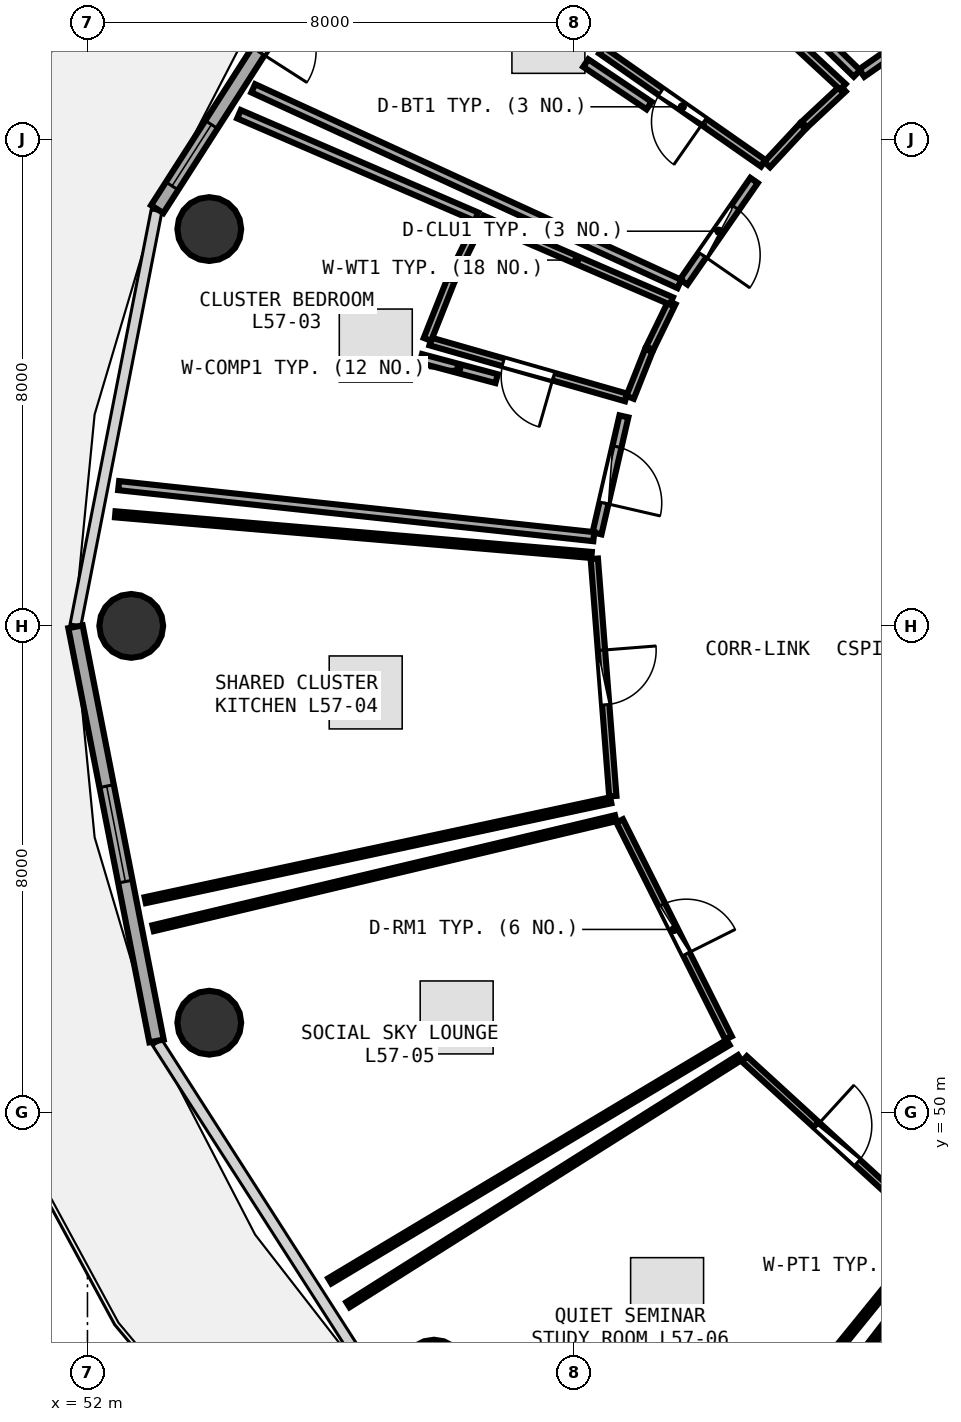
"""IFC4 building model, lengths in metres.
Left out: names, types, materials, properties, quantities, classifications, styles, units other than length and angle.
Written with IfcOpenShell. Run it as: python <this file> out.ifc"""

import sys

from ifc_helpers import new_model, si_unit, direction, frame, frame_2d, origin, origin_2d, place, context, subcontext, project, spatial, rectangle, circle, extrude, element, fill, save


model = new_model("IFC4")
c1 = context("Model", 3, precision=1e-05, world=origin(), true_north=direction((0.0, 1.0)))
c2 = subcontext(c1, "Body", "Model", "MODEL_VIEW")
j1 = project(units=[si_unit("LENGTHUNIT", "METRE"), si_unit("PLANEANGLEUNIT", "RADIAN")], contexts=[c1])
p1 = place(None, origin())
s1 = spatial("IfcSite", under=j1, at=p1, CompositionType="ELEMENT")
p2 = place(p1, origin())
s2 = spatial("IfcBuilding", under=s1, at=p2, CompositionType="ELEMENT")
p3 = place(p2, frame((0.0, 0.0, 223.2)))
s3 = spatial("IfcBuildingStorey", under=s2, at=p3, CompositionType="ELEMENT", Elevation=223.2)
for number, where, z_axis, x_axis in (
    (1, (54.003, 64.526, 0.0), (0.0, 0.0, 1.0), (1.0, 0.0, 0.0)),
    (2, (52.72, 58.0, 0.0), (0.0, 0.0, 1.0), (1.0, 0.0, 0.0)),
    (3, (54.003, 51.474, 0.0), (0.0, 0.0, 1.0), (1.0, 0.0, 0.0)),
    (4, (57.698, 45.736, 0.0), (0.0, 0.0, 1.0), (1.0, 0.0, 0.0)),
):
    element("IfcColumn", number, at=place(p3, frame(where, z_axis=z_axis, x_axis=x_axis)), inside=s3, PredefinedType="COLUMN", context=c2, shape_type="SweptSolid", body=[
        extrude(circle(Radius=0.525, at=origin_2d()), origin(), (0.0, 0.0, 1.0), 3.75),
    ])
p4 = place(p3, frame((56.986, 70.843, 0.0), z_axis=(0.0, 0.0, 1.0), x_axis=(-0.539539512973, -0.841960280501, 0.0)))
e5 = element("IfcWall", 5, at=p4, inside=s3, PredefinedType="SOLIDWALL", context=c2, shape_type="SweptSolid", body=[
    extrude(rectangle(XDim=7.115, YDim=0.24, at=frame_2d((3.557, 0.0))), origin(), (0.0, 0.0, 1.0), 3.475),
])
p5 = place(p4, frame((3.082, 0.0, 0.0)))
e6 = element("IfcOpeningElement", 6, at=p5, cuts=e5, PredefinedType="OPENING", context=c2, shape_type="SweptSolid", body=[
    extrude(rectangle(XDim=0.95, YDim=2.1, at=frame_2d((0.475, 1.05))), frame((0.0, 0.13, 0.0), z_axis=(0.0, -1.0, 0.0), x_axis=(1.0, 0.0, 0.0)), (0.0, 0.0, 1.0), 0.26),
])
p6 = place(p4, frame((5.462, 0.0, 0.85)))
e7 = element("IfcOpeningElement", 7, at=p6, cuts=e5, PredefinedType="OPENING", context=c2, shape_type="SweptSolid", body=[
    extrude(rectangle(XDim=1.2, YDim=1.45, at=frame_2d((0.6, 0.725))), frame((0.0, 0.13, 0.0), z_axis=(0.0, -1.0, 0.0), x_axis=(1.0, 0.0, 0.0)), (0.0, 0.0, 1.0), 0.26),
])
p7 = place(p3, frame((51.803, 57.985, 0.0), z_axis=(0.0, 0.0, 1.0), x_axis=(0.192069055673, -0.981381413036, 0.0)))
e8 = element("IfcWall", 8, at=p7, inside=s3, PredefinedType="SOLIDWALL", context=c2, shape_type="SweptSolid", body=[
    extrude(rectangle(XDim=6.94, YDim=0.24, at=frame_2d((3.47, 0.0))), origin(), (0.0, 0.0, 1.0), 3.475),
])
p8 = place(p7, frame((2.67, 0.0, 0.85)))
e9 = element("IfcOpeningElement", 9, at=p8, cuts=e8, PredefinedType="OPENING", context=c2, shape_type="SweptSolid", body=[
    extrude(rectangle(XDim=1.6, YDim=1.45, at=frame_2d((0.8, 0.725))), frame((0.0, 0.13, 0.0), z_axis=(0.0, -1.0, 0.0), x_axis=(1.0, 0.0, 0.0)), (0.0, 0.0, 1.0), 0.26),
])
p9 = place(p3, frame((66.466, 68.302, 0.0), z_axis=(0.0, 0.0, 1.0), x_axis=(-0.819606107513, -0.572927419948, 0.0)))
e10 = element("IfcWall", 10, at=p9, inside=s3, PredefinedType="PARTITIONING", context=c2, shape_type="SweptSolid", body=[
    extrude(rectangle(XDim=2.114, YDim=0.15, at=frame_2d((1.057, 0.0))), origin(), (0.0, 0.0, 1.0), 3.025),
])
p10 = place(p9, frame((0.582, 0.0, 0.0)))
e11 = element("IfcOpeningElement", 11, at=p10, cuts=e10, PredefinedType="OPENING", context=c2, shape_type="SweptSolid", body=[
    extrude(rectangle(XDim=0.95, YDim=2.08, at=frame_2d((0.475, 1.04))), frame((0.0, 0.085, 0.0), z_axis=(0.0, -1.0, 0.0), x_axis=(1.0, 0.0, 0.0)), (0.0, 0.0, 1.0), 0.17),
])
p11 = place(p3, frame((63.115, 65.606, 0.0), z_axis=(0.0, 0.0, 1.0), x_axis=(-0.819768322712, 0.57269529165, 0.0)))
e12 = element("IfcWall", 12, at=p11, inside=s3, PredefinedType="PLUMBINGWALL", context=c2, shape_type="SweptSolid", body=[
    extrude(rectangle(XDim=3.248, YDim=0.13, at=frame_2d((1.624, 0.0))), origin(), (0.0, 0.0, 1.0), 3.175),
])
p12 = place(p11, frame((1.194, 0.0, 0.0)))
e13 = element("IfcOpeningElement", 13, at=p12, cuts=e12, PredefinedType="OPENING", context=c2, shape_type="SweptSolid", body=[
    extrude(rectangle(XDim=0.86, YDim=2.05, at=frame_2d((0.43, 1.025))), frame((0.0, 0.075, 0.0), z_axis=(0.0, -1.0, 0.0), x_axis=(1.0, 0.0, 0.0)), (0.0, 0.0, 1.0), 0.15),
])
p13 = place(p3, frame((62.963, 65.326, 0.0), z_axis=(0.0, 0.0, 1.0), x_axis=(-0.569634666298, -0.821898014933, 0.0)))
e14 = element("IfcWall", 14, at=p13, inside=s3, PredefinedType="PARTITIONING", context=c2, shape_type="SweptSolid", body=[
    extrude(rectangle(XDim=2.032, YDim=0.15, at=frame_2d((1.016, 0.0))), origin(), (0.0, 0.0, 1.0), 3.025),
])
p14 = place(p13, frame((0.541, 0.0, 0.0)))
e15 = element("IfcOpeningElement", 15, at=p14, cuts=e14, PredefinedType="OPENING", context=c2, shape_type="SweptSolid", body=[
    extrude(rectangle(XDim=0.95, YDim=2.08, at=frame_2d((0.475, 1.04))), frame((0.0, 0.085, 0.0), z_axis=(0.0, -1.0, 0.0), x_axis=(1.0, 0.0, 0.0)), (0.0, 0.0, 1.0), 0.17),
])
p15 = place(p3, frame((60.859, 61.757, 0.0), z_axis=(0.0, 0.0, 1.0), x_axis=(-0.961479890051, 0.274875282679, 0.0)))
e16 = element("IfcWall", 16, at=p15, inside=s3, PredefinedType="PLUMBINGWALL", context=c2, shape_type="SweptSolid", body=[
    extrude(rectangle(XDim=3.347, YDim=0.13, at=frame_2d((1.673, 0.0))), origin(), (0.0, 0.0, 1.0), 3.175),
])
p16 = place(p15, frame((1.243, 0.0, 0.0)))
e17 = element("IfcOpeningElement", 17, at=p16, cuts=e16, PredefinedType="OPENING", context=c2, shape_type="SweptSolid", body=[
    extrude(rectangle(XDim=0.86, YDim=2.05, at=frame_2d((0.43, 1.025))), frame((0.0, 0.075, 0.0), z_axis=(0.0, -1.0, 0.0), x_axis=(1.0, 0.0, 0.0)), (0.0, 0.0, 1.0), 0.15),
])
p17 = place(p3, frame((60.823, 61.446, 0.0), z_axis=(0.0, 0.0, 1.0), x_axis=(-0.223956243079, -0.97459920028, 0.0)))
e18 = element("IfcWall", 18, at=p17, inside=s3, PredefinedType="PARTITIONING", context=c2, shape_type="SweptSolid", body=[
    extrude(rectangle(XDim=1.974, YDim=0.15, at=frame_2d((0.987, 0.0))), origin(), (0.0, 0.0, 1.0), 3.48),
])
p18 = place(p17, frame((0.512, 0.0, 0.0)))
e19 = element("IfcOpeningElement", 19, at=p18, cuts=e18, PredefinedType="OPENING", context=c2, shape_type="SweptSolid", body=[
    extrude(rectangle(XDim=0.95, YDim=2.08, at=frame_2d((0.475, 1.04))), frame((0.0, 0.085, 0.0), z_axis=(0.0, -1.0, 0.0), x_axis=(1.0, 0.0, 0.0)), (0.0, 0.0, 1.0), 0.17),
])
p19 = place(p3, frame((60.336, 59.103, 0.0), z_axis=(0.0, 0.0, 1.0), x_axis=(0.07781697677, -0.996967661525, 0.0)))
e20 = element("IfcWall", 20, at=p19, inside=s3, PredefinedType="PARTITIONING", context=c2, shape_type="SweptSolid", body=[
    extrude(rectangle(XDim=3.916, YDim=0.12, at=frame_2d((1.958, 0.0))), origin(), (0.0, 0.0, 1.0), 3.025),
])
p20 = place(p19, frame((1.508, 0.0, 0.0)))
e21 = element("IfcOpeningElement", 21, at=p20, cuts=e20, PredefinedType="OPENING", context=c2, shape_type="SweptSolid", body=[
    extrude(rectangle(XDim=0.9, YDim=2.08, at=frame_2d((0.45, 1.04))), frame((0.0, 0.07, 0.0), z_axis=(0.0, -1.0, 0.0), x_axis=(1.0, 0.0, 0.0)), (0.0, 0.0, 1.0), 0.14),
])
p21 = place(p3, frame((60.753, 54.793, 0.0), z_axis=(0.0, 0.0, 1.0), x_axis=(0.448191244457, -0.893937698272, 0.0)))
e22 = element("IfcWall", 22, at=p21, inside=s3, PredefinedType="PARTITIONING", context=c2, shape_type="SweptSolid", body=[
    extrude(rectangle(XDim=3.994, YDim=0.12, at=frame_2d((1.997, 0.0))), origin(), (0.0, 0.0, 1.0), 3.025),
])
p22 = place(p21, frame((1.547, 0.0, 0.0)))
e23 = element("IfcOpeningElement", 23, at=p22, cuts=e22, PredefinedType="OPENING", context=c2, shape_type="SweptSolid", body=[
    extrude(rectangle(XDim=0.9, YDim=2.08, at=frame_2d((0.45, 1.04))), frame((0.0, 0.07, 0.0), z_axis=(0.0, -1.0, 0.0), x_axis=(1.0, 0.0, 0.0)), (0.0, 0.0, 1.0), 0.14),
])
p23 = place(p3, frame((62.803, 50.879, 0.0), z_axis=(0.0, 0.0, 1.0), x_axis=(0.737723633035, -0.675102837545, 0.0)))
e24 = element("IfcWall", 24, at=p23, inside=s3, PredefinedType="PARTITIONING", context=c2, shape_type="SweptSolid", body=[
    extrude(rectangle(XDim=4.144, YDim=0.12, at=frame_2d((2.072, 0.0))), origin(), (0.0, 0.0, 1.0), 3.025),
])
p24 = place(p23, frame((1.622, 0.0, 0.0)))
e25 = element("IfcOpeningElement", 25, at=p24, cuts=e24, PredefinedType="OPENING", context=c2, shape_type="SweptSolid", body=[
    extrude(rectangle(XDim=0.9, YDim=2.08, at=frame_2d((0.45, 1.04))), frame((0.0, 0.07, 0.0), z_axis=(0.0, -1.0, 0.0), x_axis=(1.0, 0.0, 0.0)), (0.0, 0.0, 1.0), 0.14),
])
p25 = place(p3, frame((64.655, 67.085, 0.0), z_axis=(0.0, 0.0, 1.0), x_axis=(-0.716418161924, 0.697671138335, 0.0)))
e26 = element("IfcWall", 26, at=p25, inside=s3, PredefinedType="PARTITIONING", context=c2, shape_type="SweptSolid", body=[
    extrude(rectangle(XDim=7.449, YDim=0.15, at=frame_2d((3.725, 0.0))), origin(), (0.0, 0.0, 1.0), 3.075),
])
p26 = place(p3, frame((64.425, 66.836, 0.0), z_axis=(0.0, 0.0, 1.0), x_axis=(-0.73090544696, -0.68247873784, 0.0)))
e27 = element("IfcWall", 27, at=p26, inside=s3, PredefinedType="PLUMBINGWALL", context=c2, shape_type="SweptSolid", body=[
    extrude(rectangle(XDim=0.867, YDim=0.13, at=frame_2d((0.434, 0.0))), origin(), (0.0, 0.0, 1.0), 3.025),
])
p27 = place(p3, frame((63.763, 66.216, 0.0), z_axis=(0.0, 0.0, 1.0), x_axis=(-0.681245485542, -0.732055044672, 0.0)))
e28 = element("IfcWall", 28, at=p27, inside=s3, PredefinedType="PLUMBINGWALL", context=c2, shape_type="SweptSolid", body=[
    extrude(rectangle(XDim=0.86, YDim=0.13, at=frame_2d((0.43, 0.0))), origin(), (0.0, 0.0, 1.0), 3.025),
])
p28 = place(p3, frame((62.02, 69.091, 0.0), z_axis=(0.0, 0.0, 1.0), x_axis=(0.733691925976, -0.679482271849, 0.0)))
e29 = element("IfcWall", 29, at=p28, inside=s3, PredefinedType="PLUMBINGWALL", context=c2, shape_type="SweptSolid", body=[
    extrude(rectangle(XDim=3.279, YDim=0.13, at=frame_2d((1.639, 0.0))), origin(), (0.0, 0.0, 1.0), 3.175),
])
p29 = place(p3, frame((61.735, 63.623, 0.0), z_axis=(0.0, 0.0, 1.0), x_axis=(-0.908799831152, 0.417232389561, 0.0)))
e30 = element("IfcWall", 30, at=p29, inside=s3, PredefinedType="PARTITIONING", context=c2, shape_type="SweptSolid", body=[
    extrude(rectangle(XDim=7.712, YDim=0.15, at=frame_2d((3.856, 0.0))), origin(), (0.0, 0.0, 1.0), 3.025),
])
p30 = place(p3, frame((60.195, 67.256, 0.0), z_axis=(0.0, 0.0, 1.0), x_axis=(0.830279043522, -0.557347925347, 0.0)))
e31 = element("IfcWall", 31, at=p30, inside=s3, PredefinedType="PARTITIONING", context=c2, shape_type="SweptSolid", body=[
    extrude(rectangle(XDim=1.254, YDim=0.15, at=frame_2d((0.627, 0.0))), origin(), (0.0, 0.0, 1.0), 3.175),
])
p31 = place(p3, frame((61.613, 63.318, 0.0), z_axis=(0.0, 0.0, 1.0), x_axis=(-0.437484879269, -0.899225767208, 0.0)))
e32 = element("IfcWall", 32, at=p31, inside=s3, PredefinedType="PLUMBINGWALL", context=c2, shape_type="SweptSolid", body=[
    extrude(rectangle(XDim=0.835, YDim=0.13, at=frame_2d((0.418, 0.0))), origin(), (0.0, 0.0, 1.0), 3.235),
])
p32 = place(p3, frame((61.232, 62.531, 0.0), z_axis=(0.0, 0.0, 1.0), x_axis=(-0.369921104598, -0.929063171358, 0.0)))
e33 = element("IfcWall", 33, at=p32, inside=s3, PredefinedType="PLUMBINGWALL", context=c2, shape_type="SweptSolid", body=[
    extrude(rectangle(XDim=0.831, YDim=0.13, at=frame_2d((0.416, 0.0))), origin(), (0.0, 0.0, 1.0), 3.235),
])
p33 = place(p3, frame((57.591, 62.712, 0.0), z_axis=(0.0, 0.0, 1.0), x_axis=(0.368988727478, 0.929433870157, 0.0)))
e34 = element("IfcWall", 34, at=p33, inside=s3, PredefinedType="PLUMBINGWALL", context=c2, shape_type="SweptSolid", body=[
    extrude(rectangle(XDim=1.052, YDim=0.13, at=frame_2d((0.526, 0.0))), origin(), (0.0, 0.0, 1.0), 3.48),
])
p34 = place(p3, frame((57.996, 63.726, 0.0), z_axis=(0.0, 0.0, 1.0), x_axis=(0.438432715101, 0.898764014816, 0.0)))
e35 = element("IfcWall", 35, at=p34, inside=s3, PredefinedType="PLUMBINGWALL", context=c2, shape_type="SweptSolid", body=[
    extrude(rectangle(XDim=1.059, YDim=0.13, at=frame_2d((0.53, 0.0))), origin(), (0.0, 0.0, 1.0), 3.025),
])
p35 = place(p3, frame((58.487, 64.688, 0.0), z_axis=(0.0, 0.0, 1.0), x_axis=(0.918238400885, -0.396028078727, 0.0)))
e36 = element("IfcWall", 36, at=p35, inside=s3, PredefinedType="PLUMBINGWALL", context=c2, shape_type="SweptSolid", body=[
    extrude(rectangle(XDim=3.394, YDim=0.13, at=frame_2d((1.697, 0.0))), origin(), (0.0, 0.0, 1.0), 3.025),
])
p36 = place(p3, frame((60.327, 59.467, 0.0), z_axis=(0.0, 0.0, 1.0), x_axis=(-0.994280915129, 0.10679635673, 0.0)))
e37 = element("IfcWall", 37, at=p36, inside=s3, PredefinedType="PARTITIONING", context=c2, shape_type="SweptSolid", body=[
    extrude(rectangle(XDim=7.859, YDim=0.15, at=frame_2d((3.93, 0.0))), origin(), (0.0, 0.0, 1.0), 3.075),
])
p37 = place(p3, frame((54.492, 66.414, 0.0), z_axis=(0.0, 0.0, 1.0), x_axis=(0.918147334224, -0.396239160934, 0.0)))
e38 = element("IfcWall", 38, at=p37, inside=s3, PredefinedType="PARTITIONING", context=c2, shape_type="SweptSolid", body=[
    extrude(rectangle(XDim=4.253, YDim=0.15, at=frame_2d((2.126, 0.0))), origin(), (0.0, 0.0, 1.0), 3.025),
])
p38 = place(p3, frame((57.483, 62.398, 0.0), z_axis=(0.0, 0.0, 1.0), x_axis=(0.966263202112, -0.257556642788, 0.0)))
e39 = element("IfcWall", 39, at=p38, inside=s3, PredefinedType="PARTITIONING", context=c2, shape_type="SweptSolid", body=[
    extrude(rectangle(XDim=1.29, YDim=0.15, at=frame_2d((0.645, 0.0))), origin(), (0.0, 0.0, 1.0), 3.175),
])
p39 = place(p3, frame((60.606, 55.132, 0.0), z_axis=(0.0, 0.0, 1.0), x_axis=(-0.977761328162, -0.209720731335, 0.0)))
e40 = element("IfcWall", 40, at=p39, inside=s3, PredefinedType="PARTITIONING", context=c2, shape_type="SweptSolid", body=[
    extrude(rectangle(XDim=7.83, YDim=0.1, at=frame_2d((3.915, 0.0))), origin(), (0.0, 0.0, 1.0), 3.075),
])
p40 = place(p3, frame((52.457, 59.835, 0.0), z_axis=(0.0, 0.0, 1.0), x_axis=(0.996382192496, -0.084985448623, 0.0)))
e41 = element("IfcWall", 41, at=p40, inside=s3, PredefinedType="PARTITIONING", context=c2, shape_type="SweptSolid", body=[
    extrude(rectangle(XDim=7.863, YDim=0.1, at=frame_2d((3.931, 0.0))), origin(), (0.0, 0.0, 1.0), 3.075),
])
p41 = place(p3, frame((62.536, 51.148, 0.0), z_axis=(0.0, 0.0, 1.0), x_axis=(-0.858084969996, -0.513507725615, 0.0)))
e42 = element("IfcWall", 42, at=p41, inside=s3, PredefinedType="PARTITIONING", context=c2, shape_type="SweptSolid", body=[
    extrude(rectangle(XDim=7.634, YDim=0.1, at=frame_2d((3.817, 0.0))), origin(), (0.0, 0.0, 1.0), 3.025),
])
p42 = place(p3, frame((53.08, 53.028, 0.0), z_axis=(0.0, 0.0, 1.0), x_axis=(0.972861128156, 0.231389769272, 0.0)))
e43 = element("IfcWall", 43, at=p42, inside=s3, PredefinedType="PARTITIONING", context=c2, shape_type="SweptSolid", body=[
    extrude(rectangle(XDim=7.819, YDim=0.1, at=frame_2d((3.91, 0.0))), origin(), (0.0, 0.0, 1.0), 3.075),
])
p43 = place(p3, frame((65.88, 48.01, 0.0), z_axis=(0.0, 0.0, 1.0), x_axis=(-0.630262810813, -0.776381857919, 0.0)))
e44 = element("IfcWall", 44, at=p43, inside=s3, PredefinedType="PARTITIONING", context=c2, shape_type="SweptSolid", body=[
    extrude(rectangle(XDim=7.358, YDim=0.1, at=frame_2d((3.679, 0.0))), origin(), (0.0, 0.0, 1.0), 3.025),
])
p44 = place(p3, frame((56.284, 46.836, 0.0), z_axis=(0.0, 0.0, 1.0), x_axis=(0.84583000996, 0.533452522959, 0.0)))
e45 = element("IfcWall", 45, at=p44, inside=s3, PredefinedType="PARTITIONING", context=c2, shape_type="SweptSolid", body=[
    extrude(rectangle(XDim=7.615, YDim=0.1, at=frame_2d((3.808, 0.0))), origin(), (0.0, 0.0, 1.0), 3.075),
])
p45 = place(p3, frame((61.673, 42.022, 0.0), z_axis=(0.0, 0.0, 1.0), x_axis=(0.610486992252, 0.792026282576, 0.0)))
e46 = element("IfcWall", 46, at=p45, inside=s3, PredefinedType="PARTITIONING", context=c2, shape_type="SweptSolid", body=[
    extrude(rectangle(XDim=7.339, YDim=0.1, at=frame_2d((3.669, 0.0))), origin(), (0.0, 0.0, 1.0), 3.025),
])
p46 = place(p6, origin())
e47 = element("IfcWindow", 47, at=p46, inside=s3, PartitioningType="SINGLE_PANEL", PredefinedType="WINDOW", context=c2, shape_type="SweptSolid", body=[
    extrude(rectangle(XDim=1.2, YDim=1.45, at=frame_2d((0.6, 0.725))), frame((0.0, 0.03, 0.0), z_axis=(0.0, -1.0, 0.0), x_axis=(1.0, 0.0, 0.0)), (0.0, 0.0, 1.0), 0.06),
])
fill(e7, e47)
p47 = place(p8, origin())
e48 = element("IfcWindow", 48, at=p47, inside=s3, PartitioningType="SINGLE_PANEL", PredefinedType="WINDOW", context=c2, shape_type="SweptSolid", body=[
    extrude(rectangle(XDim=1.6, YDim=1.45, at=frame_2d((0.8, 0.725))), frame((0.0, 0.03, 0.0), z_axis=(0.0, -1.0, 0.0), x_axis=(1.0, 0.0, 0.0)), (0.0, 0.0, 1.0), 0.06),
])
fill(e9, e48)
p48 = place(p12, origin())
e49 = element("IfcDoor", 49, at=p48, inside=s3, OperationType="SINGLE_SWING_LEFT", PredefinedType="DOOR", context=c2, shape_type="SweptSolid", body=[
    extrude(rectangle(XDim=0.86, YDim=2.05, at=frame_2d((0.43, 1.025))), frame((0.0, 0.025, 0.0), z_axis=(0.0, -1.0, 0.0), x_axis=(1.0, 0.0, 0.0)), (0.0, 0.0, 1.0), 0.05),
])
fill(e13, e49)
p49 = place(p14, origin())
e50 = element("IfcDoor", 50, at=p49, inside=s3, OperationType="SINGLE_SWING_RIGHT", PredefinedType="DOOR", context=c2, shape_type="SweptSolid", body=[
    extrude(rectangle(XDim=0.95, YDim=2.08, at=frame_2d((0.475, 1.04))), frame((0.0, 0.025, 0.0), z_axis=(0.0, -1.0, 0.0), x_axis=(1.0, 0.0, 0.0)), (0.0, 0.0, 1.0), 0.05),
])
fill(e15, e50)
p50 = place(p16, origin())
e51 = element("IfcDoor", 51, at=p50, inside=s3, OperationType="SINGLE_SWING_LEFT", PredefinedType="DOOR", context=c2, shape_type="SweptSolid", body=[
    extrude(rectangle(XDim=0.86, YDim=2.05, at=frame_2d((0.43, 1.025))), frame((0.0, 0.025, 0.0), z_axis=(0.0, -1.0, 0.0), x_axis=(1.0, 0.0, 0.0)), (0.0, 0.0, 1.0), 0.05),
])
fill(e17, e51)
p51 = place(p18, origin())
e52 = element("IfcDoor", 52, at=p51, inside=s3, OperationType="SINGLE_SWING_RIGHT", PredefinedType="DOOR", context=c2, shape_type="SweptSolid", body=[
    extrude(rectangle(XDim=0.95, YDim=2.08, at=frame_2d((0.475, 1.04))), frame((0.0, 0.025, 0.0), z_axis=(0.0, -1.0, 0.0), x_axis=(1.0, 0.0, 0.0)), (0.0, 0.0, 1.0), 0.05),
])
fill(e19, e52)
p52 = place(p20, origin())
e53 = element("IfcDoor", 53, at=p52, inside=s3, OperationType="SINGLE_SWING_LEFT", PredefinedType="DOOR", context=c2, shape_type="SweptSolid", body=[
    extrude(rectangle(XDim=0.9, YDim=2.08, at=frame_2d((0.45, 1.04))), frame((0.0, 0.025, 0.0), z_axis=(0.0, -1.0, 0.0), x_axis=(1.0, 0.0, 0.0)), (0.0, 0.0, 1.0), 0.05),
])
fill(e21, e53)
p53 = place(p22, origin())
e54 = element("IfcDoor", 54, at=p53, inside=s3, OperationType="SINGLE_SWING_RIGHT", PredefinedType="DOOR", context=c2, shape_type="SweptSolid", body=[
    extrude(rectangle(XDim=0.9, YDim=2.08, at=frame_2d((0.45, 1.04))), frame((0.0, 0.025, 0.0), z_axis=(0.0, -1.0, 0.0), x_axis=(1.0, 0.0, 0.0)), (0.0, 0.0, 1.0), 0.05),
])
fill(e23, e54)
p54 = place(p24, origin())
e55 = element("IfcDoor", 55, at=p54, inside=s3, OperationType="SINGLE_SWING_LEFT", PredefinedType="DOOR", context=c2, shape_type="SweptSolid", body=[
    extrude(rectangle(XDim=0.9, YDim=2.08, at=frame_2d((0.45, 1.04))), frame((0.0, 0.025, 0.0), z_axis=(0.0, -1.0, 0.0), x_axis=(1.0, 0.0, 0.0)), (0.0, 0.0, 1.0), 0.05),
])
fill(e25, e55)
save(model, sys.argv[1])
